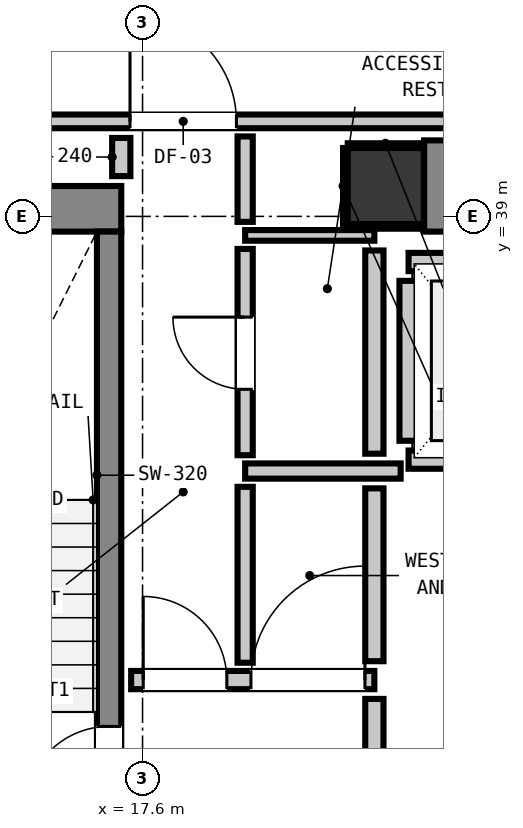
"""IFC4 building model, lengths in metres.
Left out: names, types, materials, properties, quantities, classifications, styles, units other than length and angle.
Written with IfcOpenShell. Run it as: python <this file> out.ifc"""

import sys

from ifc_helpers import new_model, si_unit, direction, frame, frame_2d, origin, origin_2d, place, context, subcontext, project, spatial, rectangle, extrude, element, fill, save


model = new_model("IFC4")
c1 = context("Model", 3, precision=1e-05, world=origin(), true_north=direction((0.0, 1.0)))
c2 = subcontext(c1, "Body", "Model", "MODEL_VIEW")
j1 = project(units=[si_unit("LENGTHUNIT", "METRE"), si_unit("PLANEANGLEUNIT", "RADIAN")], contexts=[c1])
p1 = place(None, origin())
s1 = spatial("IfcSite", under=j1, at=p1, CompositionType="ELEMENT")
p2 = place(p1, origin())
s2 = spatial("IfcBuilding", under=s1, at=p2, CompositionType="ELEMENT")
p3 = place(p2, frame((0.0, 0.0, 65.16)))
s3 = spatial("IfcBuildingStorey", under=s2, at=p3, CompositionType="ELEMENT", Elevation=65.16)
p4 = place(p3, frame((20.8, 39.4, 0.0), z_axis=(0.0, 0.0, 1.0), x_axis=(1.0, 0.0, 0.0)))
e1 = element("IfcColumn", 1, at=p4, inside=s3, PredefinedType="COLUMN", context=c2, shape_type="SweptSolid", body=[
    extrude(rectangle(XDim=1.0, YDim=1.0, at=origin_2d()), origin(), (0.0, 0.0, 1.0), 3.32),
])
p5 = place(p3, frame((13.24, 39.1, 0.0), z_axis=(0.0, 0.0, 1.0), x_axis=(1.0, 0.0, 0.0)))
e2 = element("IfcWall", 2, at=p5, inside=s3, PredefinedType="SHEAR", context=c2, shape_type="SweptSolid", body=[
    extrude(rectangle(XDim=4.08, YDim=0.6, at=frame_2d((2.04, 0.0))), origin(), (0.0, 0.0, 1.0), 3.32),
])
p6 = place(p3, frame((21.305, 39.4, 0.0), z_axis=(0.0, 0.0, 1.0), x_axis=(1.0, 0.0, 0.0)))
e3 = element("IfcWall", 3, at=p6, inside=s3, PredefinedType="SHEAR", context=c2, shape_type="SweptSolid", body=[
    extrude(rectangle(XDim=7.39, YDim=1.2, at=frame_2d((3.695, 0.0))), origin(), (0.0, 0.0, 1.0), 3.32),
])
p7 = place(p3, frame((17.16, 31.0, 0.0), z_axis=(0.0, 0.0, 1.0), x_axis=(0.0, 1.0, 0.0)))
e4 = element("IfcWall", 4, at=p7, inside=s3, PredefinedType="SHEAR", context=c2, shape_type="SweptSolid", body=[
    extrude(rectangle(XDim=7.8, YDim=0.32, at=frame_2d((3.9, 0.0))), origin(), (0.0, 0.0, 1.0), 3.32),
])
p8 = place(p7, frame((0.19, 0.0, 0.0)))
e5 = element("IfcOpeningElement", 5, at=p8, cuts=e4, PredefinedType="OPENING", context=c2, shape_type="SweptSolid", body=[
    extrude(rectangle(XDim=1.1, YDim=2.15, at=frame_2d((0.55, 1.075))), frame((0.0, 0.17, 0.0), z_axis=(0.0, -1.0, 0.0), x_axis=(1.0, 0.0, 0.0)), (0.0, 0.0, 1.0), 0.34),
])
for number, where, z_axis, x_axis in (
    (6, (21.1, 35.8, 0.0), (0.0, 0.0, 1.0), (1.0, 0.0, 0.0)),
    (7, (21.1, 38.4, 0.0), (0.0, 0.0, 1.0), (1.0, 0.0, 0.0)),
):
    element("IfcWall", number, at=place(p3, frame(where, z_axis=z_axis, x_axis=x_axis)), inside=s3, PredefinedType="PARTITIONING", context=c2, shape_type="SweptSolid", body=[
        extrude(rectangle(XDim=2.2, YDim=0.24, at=frame_2d((1.1, 0.0))), origin(), (0.0, 0.0, 1.0), 3.06),
    ])
p9 = place(p3, frame((21.1, 36.048, 0.0), z_axis=(0.0, 0.0, 1.0), x_axis=(0.0, 1.0, 0.0)))
e8 = element("IfcWall", 8, at=p9, inside=s3, PredefinedType="PARTITIONING", context=c2, shape_type="SweptSolid", body=[
    extrude(rectangle(XDim=2.104, YDim=0.24, at=frame_2d((1.052, 0.0))), origin(), (0.0, 0.0, 1.0), 2.295),
])
p10 = place(p3, frame((17.45, 32.9, 0.0), z_axis=(0.0, 0.0, 1.0), x_axis=(1.0, 0.0, 0.0)))
e9 = element("IfcWall", 9, at=p10, inside=s3, PredefinedType="PARTITIONING", context=c2, shape_type="SweptSolid", body=[
    extrude(rectangle(XDim=3.2, YDim=0.24, at=frame_2d((1.6, 0.0))), origin(), (0.0, 0.0, 1.0), 3.06),
])
p11 = place(p10, frame((0.159, 0.0, 0.0)))
e10 = element("IfcOpeningElement", 10, at=p11, cuts=e9, PredefinedType="OPENING", context=c2, shape_type="SweptSolid", body=[
    extrude(rectangle(XDim=1.1, YDim=2.15, at=frame_2d((0.55, 1.075))), frame((0.0, 0.13, 0.0), z_axis=(0.0, -1.0, 0.0), x_axis=(1.0, 0.0, 0.0)), (0.0, 0.0, 1.0), 0.26),
])
p12 = place(p10, frame((1.576, 0.0, 0.0)))
e11 = element("IfcOpeningElement", 11, at=p12, cuts=e9, PredefinedType="OPENING", context=c2, shape_type="SweptSolid", body=[
    extrude(rectangle(XDim=1.5, YDim=2.15, at=frame_2d((0.75, 1.075))), frame((0.0, 0.13, 0.0), z_axis=(0.0, -1.0, 0.0), x_axis=(1.0, 0.0, 0.0)), (0.0, 0.0, 1.0), 0.26),
])
p13 = place(p3, frame((18.95, 35.65, 0.0), z_axis=(0.0, 0.0, 1.0), x_axis=(1.0, 0.0, 0.0)))
e12 = element("IfcWall", 12, at=p13, inside=s3, PredefinedType="PARTITIONING", context=c2, shape_type="SweptSolid", body=[
    extrude(rectangle(XDim=2.046, YDim=0.2, at=frame_2d((1.023, 0.0))), origin(), (0.0, 0.0, 1.0), 3.06),
])
p14 = place(p3, frame((10.15, 40.25, 0.0), z_axis=(0.0, 0.0, 1.0), x_axis=(1.0, 0.0, 0.0)))
e13 = element("IfcWall", 13, at=p14, inside=s3, PredefinedType="PARTITIONING", context=c2, shape_type="SweptSolid", body=[
    extrude(rectangle(XDim=40.023, YDim=0.18, at=frame_2d((20.012, 0.0))), origin(), (0.0, 0.0, 1.0), 3.06),
])
p15 = place(p14, frame((7.285, 0.0, 0.0)))
e14 = element("IfcOpeningElement", 14, at=p15, cuts=e13, PredefinedType="OPENING", context=c2, shape_type="SweptSolid", body=[
    extrude(rectangle(XDim=1.4, YDim=2.15, at=frame_2d((0.7, 1.075))), frame((0.0, 0.1, 0.0), z_axis=(0.0, -1.0, 0.0), x_axis=(1.0, 0.0, 0.0)), (0.0, 0.0, 1.0), 0.2),
])
p16 = place(p14, frame((0.324, 0.0, 0.0)))
e15 = element("IfcOpeningElement", 15, at=p16, cuts=e13, PredefinedType="OPENING", context=c2, shape_type="SweptSolid", body=[
    extrude(rectangle(XDim=1.4, YDim=2.15, at=frame_2d((0.7, 1.075))), frame((0.0, 0.1, 0.0), z_axis=(0.0, -1.0, 0.0), x_axis=(1.0, 0.0, 0.0)), (0.0, 0.0, 1.0), 0.2),
])
p17 = place(p14, frame((31.825, 0.0, 0.0)))
e16 = element("IfcOpeningElement", 16, at=p17, cuts=e13, PredefinedType="OPENING", context=c2, shape_type="SweptSolid", body=[
    extrude(rectangle(XDim=1.0, YDim=2.15, at=frame_2d((0.5, 1.075))), frame((0.0, 0.1, 0.0), z_axis=(0.0, -1.0, 0.0), x_axis=(1.0, 0.0, 0.0)), (0.0, 0.0, 1.0), 0.2),
])
p18 = place(p3, frame((18.95, 38.75, 0.0), z_axis=(0.0, 0.0, 1.0), x_axis=(1.0, 0.0, 0.0)))
e17 = element("IfcWall", 17, at=p18, inside=s3, PredefinedType="PARTITIONING", context=c2, shape_type="SweptSolid", body=[
    extrude(rectangle(XDim=1.7, YDim=0.14, at=frame_2d((0.85, 0.0))), origin(), (0.0, 0.0, 1.0), 3.06),
])
p19 = place(p3, frame((17.32, 39.53, 0.0), z_axis=(0.0, 0.0, 1.0), x_axis=(0.0, 1.0, 0.0)))
e18 = element("IfcWall", 18, at=p19, inside=s3, PredefinedType="PARTITIONING", context=c2, shape_type="SweptSolid", body=[
    extrude(rectangle(XDim=0.502, YDim=0.24, at=frame_2d((0.251, 0.0))), origin(), (0.0, 0.0, 1.0), 3.06),
])
p20 = place(p3, frame((20.65, 31.332, 0.0), z_axis=(0.0, 0.0, 1.0), x_axis=(0.0, 1.0, 0.0)))
e19 = element("IfcWall", 19, at=p20, inside=s3, PredefinedType="PARTITIONING", context=c2, shape_type="SweptSolid", body=[
    extrude(rectangle(XDim=1.32, YDim=0.24, at=frame_2d((0.66, 0.0))), origin(), (0.0, 0.0, 1.0), 2.295),
])
p21 = place(p3, frame((20.65, 33.148, 0.0), z_axis=(0.0, 0.0, 1.0), x_axis=(0.0, 1.0, 0.0)))
e20 = element("IfcWall", 20, at=p21, inside=s3, PredefinedType="PARTITIONING", context=c2, shape_type="SweptSolid", body=[
    extrude(rectangle(XDim=2.274, YDim=0.24, at=frame_2d((1.137, 0.0))), origin(), (0.0, 0.0, 1.0), 2.295),
])
p22 = place(p3, frame((20.65, 35.878, 0.0), z_axis=(0.0, 0.0, 1.0), x_axis=(0.0, 1.0, 0.0)))
e21 = element("IfcWall", 21, at=p22, inside=s3, PredefinedType="PARTITIONING", context=c2, shape_type="SweptSolid", body=[
    extrude(rectangle(XDim=2.674, YDim=0.24, at=frame_2d((1.337, 0.0))), origin(), (0.0, 0.0, 1.0), 2.295),
])
p23 = place(p3, frame((18.95, 33.128, 0.0), z_axis=(0.0, 0.0, 1.0), x_axis=(0.0, 1.0, 0.0)))
e22 = element("IfcWall", 22, at=p23, inside=s3, PredefinedType="PARTITIONING", context=c2, shape_type="SweptSolid", body=[
    extrude(rectangle(XDim=2.314, YDim=0.2, at=frame_2d((1.157, 0.0))), origin(), (0.0, 0.0, 1.0), 3.06),
])
p24 = place(p3, frame((18.95, 35.858, 0.0), z_axis=(0.0, 0.0, 1.0), x_axis=(0.0, 1.0, 0.0)))
e23 = element("IfcWall", 23, at=p24, inside=s3, PredefinedType="PARTITIONING", context=c2, shape_type="SweptSolid", body=[
    extrude(rectangle(XDim=2.714, YDim=0.2, at=frame_2d((1.357, 0.0))), origin(), (0.0, 0.0, 1.0), 3.06),
])
p25 = place(p24, frame((0.867, 0.0, 0.0)))
e24 = element("IfcOpeningElement", 24, at=p25, cuts=e23, PredefinedType="OPENING", context=c2, shape_type="SweptSolid", body=[
    extrude(rectangle(XDim=0.95, YDim=2.1, at=frame_2d((0.475, 1.05))), frame((0.0, 0.11, 0.0), z_axis=(0.0, -1.0, 0.0), x_axis=(1.0, 0.0, 0.0)), (0.0, 0.0, 1.0), 0.22),
])
p26 = place(p3, frame((18.95, 38.928, 0.0), z_axis=(0.0, 0.0, 1.0), x_axis=(0.0, 1.0, 0.0)))
e25 = element("IfcWall", 25, at=p26, inside=s3, PredefinedType="PARTITIONING", context=c2, shape_type="SweptSolid", body=[
    extrude(rectangle(XDim=1.124, YDim=0.2, at=frame_2d((0.562, 0.0))), origin(), (0.0, 0.0, 1.0), 3.06),
])
for number, where, z_axis, x_axis in (
    (26, (20.3, 38.868, 0.0), (0.0, 0.0, 1.0), (1.0, 0.0, 0.0)),
    (27, (20.3, 39.932, 0.0), (0.0, 0.0, 1.0), (1.0, 0.0, 0.0)),
):
    element("IfcWall", number, at=place(p3, frame(where, z_axis=z_axis, x_axis=x_axis)), inside=s3, PredefinedType="PARTITIONING", context=c2, shape_type="SweptSolid", body=[
        extrude(rectangle(XDim=0.99, YDim=0.06, at=frame_2d((0.495, 0.0))), origin(), (0.0, 0.0, 1.0), 1.45),
    ])
p27 = place(p3, frame((20.268, 38.9, 0.0), z_axis=(0.0, 0.0, 1.0), x_axis=(0.0, 1.0, 0.0)))
e28 = element("IfcWall", 28, at=p27, inside=s3, PredefinedType="PARTITIONING", context=c2, shape_type="SweptSolid", body=[
    extrude(rectangle(XDim=1.0, YDim=0.06, at=frame_2d((0.5, 0.0))), origin(), (0.0, 0.0, 1.0), 1.45),
])
p28 = place(p8, origin())
e29 = element("IfcDoor", 29, at=p28, inside=s3, OperationType="SINGLE_SWING_LEFT", PredefinedType="DOOR", context=c2, shape_type="SweptSolid", body=[
    extrude(rectangle(XDim=1.1, YDim=2.15, at=frame_2d((0.55, 1.075))), frame((0.0, 0.025, 0.0), z_axis=(0.0, -1.0, 0.0), x_axis=(1.0, 0.0, 0.0)), (0.0, 0.0, 1.0), 0.05),
])
fill(e5, e29)
p29 = place(p11, origin())
e30 = element("IfcDoor", 30, at=p29, inside=s3, OperationType="SINGLE_SWING_LEFT", PredefinedType="DOOR", context=c2, shape_type="SweptSolid", body=[
    extrude(rectangle(XDim=1.1, YDim=2.15, at=frame_2d((0.55, 1.075))), frame((0.0, 0.025, 0.0), z_axis=(0.0, -1.0, 0.0), x_axis=(1.0, 0.0, 0.0)), (0.0, 0.0, 1.0), 0.05),
])
fill(e10, e30)
p30 = place(p15, origin())
e31 = element("IfcDoor", 31, at=p30, inside=s3, OperationType="SINGLE_SWING_LEFT", PredefinedType="DOOR", context=c2, shape_type="SweptSolid", body=[
    extrude(rectangle(XDim=1.4, YDim=2.15, at=frame_2d((0.7, 1.075))), frame((0.0, 0.025, 0.0), z_axis=(0.0, -1.0, 0.0), x_axis=(1.0, 0.0, 0.0)), (0.0, 0.0, 1.0), 0.05),
])
fill(e14, e31)
p31 = place(p12, origin())
e32 = element("IfcDoor", 32, at=p31, inside=s3, OperationType="SINGLE_SWING_RIGHT", PredefinedType="DOOR", context=c2, shape_type="SweptSolid", body=[
    extrude(rectangle(XDim=1.5, YDim=2.15, at=frame_2d((0.75, 1.075))), frame((0.0, 0.025, 0.0), z_axis=(0.0, -1.0, 0.0), x_axis=(1.0, 0.0, 0.0)), (0.0, 0.0, 1.0), 0.05),
])
fill(e11, e32)
p32 = place(p25, origin())
e33 = element("IfcDoor", 33, at=p32, inside=s3, OperationType="SINGLE_SWING_RIGHT", PredefinedType="DOOR", context=c2, shape_type="SweptSolid", body=[
    extrude(rectangle(XDim=0.95, YDim=2.1, at=frame_2d((0.475, 1.05))), frame((0.0, 0.025, 0.0), z_axis=(0.0, -1.0, 0.0), x_axis=(1.0, 0.0, 0.0)), (0.0, 0.0, 1.0), 0.05),
])
fill(e24, e33)
save(model, sys.argv[1])
